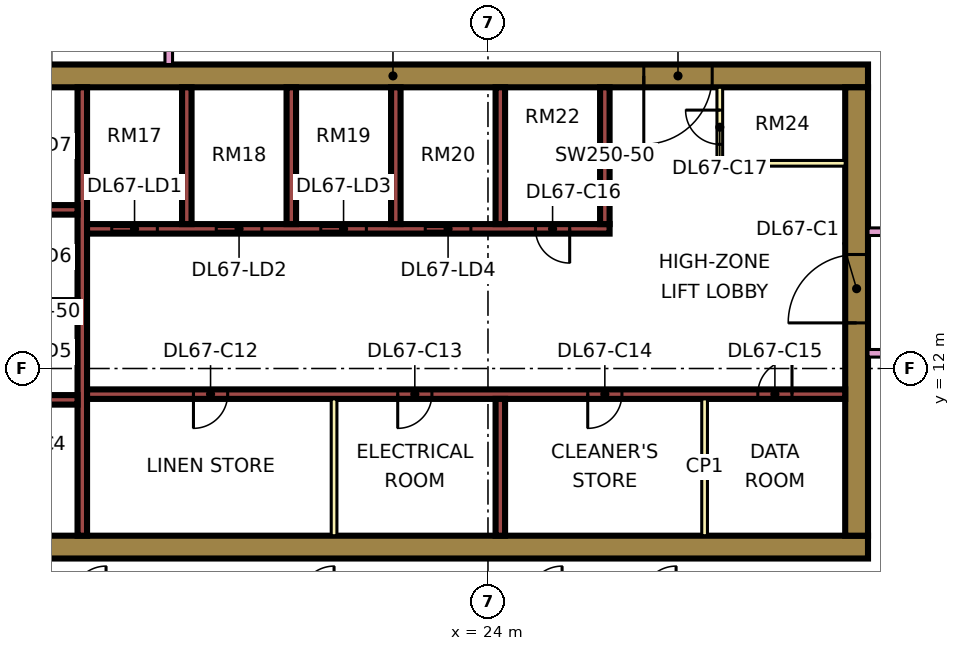
"""IFC4 building model, lengths in metres.
Left out: names, types, materials, properties, quantities, classifications, styles, units other than length and angle.
Written with IfcOpenShell. Run it as: python <this file> out.ifc"""

import sys

from ifc_helpers import new_model, si_unit, direction, frame, frame_2d, origin, place, context, subcontext, project, spatial, rectangle, extrude, element, fill, save


model = new_model("IFC4")
c1 = context("Model", 3, precision=1e-05, world=origin(), true_north=direction((0.0, 1.0)))
c2 = subcontext(c1, "Body", "Model", "MODEL_VIEW")
j1 = project(units=[si_unit("LENGTHUNIT", "METRE"), si_unit("PLANEANGLEUNIT", "RADIAN")], contexts=[c1])
p1 = place(None, origin())
s1 = spatial("IfcSite", under=j1, at=p1, CompositionType="ELEMENT")
p2 = place(p1, origin())
s2 = spatial("IfcBuilding", under=s1, at=p2, CompositionType="ELEMENT")
p3 = place(p2, frame((0.0, 0.0, 288.4)))
s3 = spatial("IfcBuildingStorey", under=s2, at=p3, CompositionType="ELEMENT", Elevation=288.4)
p4 = place(p3, frame((9.0, 7.3, 0.0), z_axis=(0.0, 0.0, 1.0), x_axis=(1.0, 0.0, 0.0)))
e1 = element("IfcWall", 1, at=p4, inside=s3, PredefinedType="SHEAR", context=c2, shape_type="SweptSolid", body=[
    extrude(rectangle(XDim=25.0, YDim=0.6, at=frame_2d((12.5, 0.0))), origin(), (0.0, 0.0, 1.0), 3.75),
])
p5 = place(p3, frame((9.0, 19.7, 0.0), z_axis=(0.0, 0.0, 1.0), x_axis=(1.0, 0.0, 0.0)))
e2 = element("IfcWall", 2, at=p5, inside=s3, PredefinedType="SHEAR", context=c2, shape_type="SweptSolid", body=[
    extrude(rectangle(XDim=25.0, YDim=0.6, at=frame_2d((12.5, 0.0))), origin(), (0.0, 0.0, 1.0), 3.75),
])
p6 = place(p5, frame((19.1, 0.0, 0.0)))
e3 = element("IfcOpeningElement", 3, at=p6, cuts=e2, PredefinedType="OPENING", context=c2, shape_type="SweptSolid", body=[
    extrude(rectangle(XDim=1.8, YDim=2.4, at=frame_2d((0.9, 1.2))), frame((0.0, 0.31, 0.0), z_axis=(0.0, -1.0, 0.0), x_axis=(1.0, 0.0, 0.0)), (0.0, 0.0, 1.0), 0.62),
])
p7 = place(p3, frame((33.7, 7.6, 0.0), z_axis=(0.0, 0.0, 1.0), x_axis=(0.0, 1.0, 0.0)))
e4 = element("IfcWall", 4, at=p7, inside=s3, PredefinedType="SHEAR", context=c2, shape_type="SweptSolid", body=[
    extrude(rectangle(XDim=11.8, YDim=0.6, at=frame_2d((5.9, 0.0))), origin(), (0.0, 0.0, 1.0), 3.75),
])
p8 = place(p7, frame((5.6, 0.0, 0.0)))
e5 = element("IfcOpeningElement", 5, at=p8, cuts=e4, PredefinedType="OPENING", context=c2, shape_type="SweptSolid", body=[
    extrude(rectangle(XDim=1.8, YDim=2.4, at=frame_2d((0.9, 1.2))), frame((0.0, 0.31, 0.0), z_axis=(0.0, -1.0, 0.0), x_axis=(1.0, 0.0, 0.0)), (0.0, 0.0, 1.0), 0.62),
])
p9 = place(p3, frame((13.325, 7.6, 0.0), z_axis=(0.0, 0.0, 1.0), x_axis=(0.0, 1.0, 0.0)))
e6 = element("IfcWall", 6, at=p9, inside=s3, PredefinedType="SHEAR", context=c2, shape_type="SweptSolid", body=[
    extrude(rectangle(XDim=11.8, YDim=0.25, at=frame_2d((5.9, 0.0))), origin(), (0.0, 0.0, 1.0), 3.75),
])
p10 = place(p3, frame((13.45, 11.325, 0.0), z_axis=(0.0, 0.0, 1.0), x_axis=(1.0, 0.0, 0.0)))
e7 = element("IfcWall", 7, at=p10, inside=s3, PredefinedType="SHEAR", context=c2, shape_type="SweptSolid", body=[
    extrude(rectangle(XDim=19.95, YDim=0.25, at=frame_2d((9.975, 0.0))), origin(), (0.0, 0.0, 1.0), 3.75),
])
p11 = place(p10, frame((2.8, 0.0, 0.0)))
e8 = element("IfcOpeningElement", 8, at=p11, cuts=e7, PredefinedType="OPENING", context=c2, shape_type="SweptSolid", body=[
    extrude(rectangle(XDim=0.9, YDim=2.1, at=frame_2d((0.45, 1.05))), frame((0.0, 0.135, 0.0), z_axis=(0.0, -1.0, 0.0), x_axis=(1.0, 0.0, 0.0)), (0.0, 0.0, 1.0), 0.27),
])
p12 = place(p10, frame((8.175, 0.0, 0.0)))
e9 = element("IfcOpeningElement", 9, at=p12, cuts=e7, PredefinedType="OPENING", context=c2, shape_type="SweptSolid", body=[
    extrude(rectangle(XDim=0.9, YDim=2.1, at=frame_2d((0.45, 1.05))), frame((0.0, 0.135, 0.0), z_axis=(0.0, -1.0, 0.0), x_axis=(1.0, 0.0, 0.0)), (0.0, 0.0, 1.0), 0.27),
])
p13 = place(p10, frame((13.175, 0.0, 0.0)))
e10 = element("IfcOpeningElement", 10, at=p13, cuts=e7, PredefinedType="OPENING", context=c2, shape_type="SweptSolid", body=[
    extrude(rectangle(XDim=0.9, YDim=2.1, at=frame_2d((0.45, 1.05))), frame((0.0, 0.135, 0.0), z_axis=(0.0, -1.0, 0.0), x_axis=(1.0, 0.0, 0.0)), (0.0, 0.0, 1.0), 0.27),
])
p14 = place(p10, frame((17.65, 0.0, 0.0)))
e11 = element("IfcOpeningElement", 11, at=p14, cuts=e7, PredefinedType="OPENING", context=c2, shape_type="SweptSolid", body=[
    extrude(rectangle(XDim=0.9, YDim=2.1, at=frame_2d((0.45, 1.05))), frame((0.0, 0.135, 0.0), z_axis=(0.0, -1.0, 0.0), x_axis=(1.0, 0.0, 0.0)), (0.0, 0.0, 1.0), 0.27),
])
p15 = place(p3, frame((13.45, 15.675, 0.0), z_axis=(0.0, 0.0, 1.0), x_axis=(1.0, 0.0, 0.0)))
e12 = element("IfcWall", 12, at=p15, inside=s3, PredefinedType="SHEAR", context=c2, shape_type="SweptSolid", body=[
    extrude(rectangle(XDim=13.75, YDim=0.25, at=frame_2d((6.875, 0.0))), origin(), (0.0, 0.0, 1.0), 3.75),
])
p16 = place(p15, frame((0.65, 0.0, 0.0)))
e13 = element("IfcOpeningElement", 13, at=p16, cuts=e12, PredefinedType="OPENING", context=c2, shape_type="SweptSolid", body=[
    extrude(rectangle(XDim=1.2, YDim=2.2, at=frame_2d((0.6, 1.1))), frame((0.0, 0.135, 0.0), z_axis=(0.0, -1.0, 0.0), x_axis=(1.0, 0.0, 0.0)), (0.0, 0.0, 1.0), 0.27),
])
p17 = place(p15, frame((3.4, 0.0, 0.0)))
e14 = element("IfcOpeningElement", 14, at=p17, cuts=e12, PredefinedType="OPENING", context=c2, shape_type="SweptSolid", body=[
    extrude(rectangle(XDim=1.2, YDim=2.2, at=frame_2d((0.6, 1.1))), frame((0.0, 0.135, 0.0), z_axis=(0.0, -1.0, 0.0), x_axis=(1.0, 0.0, 0.0)), (0.0, 0.0, 1.0), 0.27),
])
p18 = place(p15, frame((6.15, 0.0, 0.0)))
e15 = element("IfcOpeningElement", 15, at=p18, cuts=e12, PredefinedType="OPENING", context=c2, shape_type="SweptSolid", body=[
    extrude(rectangle(XDim=1.2, YDim=2.2, at=frame_2d((0.6, 1.1))), frame((0.0, 0.135, 0.0), z_axis=(0.0, -1.0, 0.0), x_axis=(1.0, 0.0, 0.0)), (0.0, 0.0, 1.0), 0.27),
])
p19 = place(p15, frame((8.9, 0.0, 0.0)))
e16 = element("IfcOpeningElement", 16, at=p19, cuts=e12, PredefinedType="OPENING", context=c2, shape_type="SweptSolid", body=[
    extrude(rectangle(XDim=1.2, YDim=2.2, at=frame_2d((0.6, 1.1))), frame((0.0, 0.135, 0.0), z_axis=(0.0, -1.0, 0.0), x_axis=(1.0, 0.0, 0.0)), (0.0, 0.0, 1.0), 0.27),
])
p20 = place(p15, frame((11.8, 0.0, 0.0)))
e17 = element("IfcOpeningElement", 17, at=p20, cuts=e12, PredefinedType="OPENING", context=c2, shape_type="SweptSolid", body=[
    extrude(rectangle(XDim=0.9, YDim=2.1, at=frame_2d((0.45, 1.05))), frame((0.0, 0.135, 0.0), z_axis=(0.0, -1.0, 0.0), x_axis=(1.0, 0.0, 0.0)), (0.0, 0.0, 1.0), 0.27),
])
for number, where, z_axis, x_axis in (
    (18, (10.2, 11.175, 0.0), (0.0, 0.0, 1.0), (1.0, 0.0, 0.0)),
    (19, (10.2, 13.675, 0.0), (0.0, 0.0, 1.0), (1.0, 0.0, 0.0)),
    (20, (10.2, 16.175, 0.0), (0.0, 0.0, 1.0), (1.0, 0.0, 0.0)),
):
    element("IfcWall", number, at=place(p3, frame(where, z_axis=z_axis, x_axis=x_axis)), inside=s3, PredefinedType="SHEAR", context=c2, shape_type="SweptSolid", body=[
        extrude(rectangle(XDim=3.0, YDim=0.25, at=frame_2d((1.5, 0.0))), origin(), (0.0, 0.0, 1.0), 3.75),
    ])
for number, where, z_axis, x_axis in (
    (21, (24.325, 7.6, 0.0), (0.0, 0.0, 1.0), (0.0, 1.0, 0.0)),
    (22, (16.075, 15.8, 0.0), (0.0, 0.0, 1.0), (0.0, 1.0, 0.0)),
    (23, (18.825, 15.8, 0.0), (0.0, 0.0, 1.0), (0.0, 1.0, 0.0)),
    (24, (21.575, 15.8, 0.0), (0.0, 0.0, 1.0), (0.0, 1.0, 0.0)),
    (25, (24.325, 15.8, 0.0), (0.0, 0.0, 1.0), (0.0, 1.0, 0.0)),
    (26, (27.075, 15.8, 0.0), (0.0, 0.0, 1.0), (0.0, 1.0, 0.0)),
):
    element("IfcWall", number, at=place(p3, frame(where, z_axis=z_axis, x_axis=x_axis)), inside=s3, PredefinedType="SHEAR", context=c2, shape_type="SweptSolid", body=[
        extrude(rectangle(XDim=3.6, YDim=0.25, at=frame_2d((1.8, 0.0))), origin(), (0.0, 0.0, 1.0), 3.75),
    ])
p21 = place(p3, frame((-1.447, 12.553, 0.0), z_axis=(0.0, 0.0, 1.0), x_axis=(0.707106781187, -0.707106781187, 0.0)))
e27 = element("IfcWall", 27, at=p21, inside=s3, PredefinedType="SOLIDWALL", context=c2, shape_type="SweptSolid", body=[
    extrude(rectangle(XDim=19.799, YDim=0.15, at=frame_2d((9.899, 0.0))), origin(), (0.0, 0.0, 1.0), 3.35),
])
p22 = place(p21, frame((2.212, 0.0, 0.45)))
e28 = element("IfcOpeningElement", 28, at=p22, cuts=e27, PredefinedType="OPENING", context=c2, shape_type="SweptSolid", body=[
    extrude(rectangle(XDim=3.0, YDim=2.4, at=frame_2d((1.5, 1.2))), frame((0.0, 0.085, 0.0), z_axis=(0.0, -1.0, 0.0), x_axis=(1.0, 0.0, 0.0)), (0.0, 0.0, 1.0), 0.17),
])
p23 = place(p21, frame((10.216, 0.0, 0.45)))
e29 = element("IfcOpeningElement", 29, at=p23, cuts=e27, PredefinedType="OPENING", context=c2, shape_type="SweptSolid", body=[
    extrude(rectangle(XDim=3.0, YDim=2.4, at=frame_2d((1.5, 1.2))), frame((0.0, 0.085, 0.0), z_axis=(0.0, -1.0, 0.0), x_axis=(1.0, 0.0, 0.0)), (0.0, 0.0, 1.0), 0.17),
])
for number, where, z_axis, x_axis in (
    (30, (19.95, 7.6, 0.0), (0.0, 0.0, 1.0), (0.0, 1.0, 0.0)),
    (31, (29.7, 7.6, 0.0), (0.0, 0.0, 1.0), (0.0, 1.0, 0.0)),
):
    element("IfcWall", number, at=place(p3, frame(where, z_axis=z_axis, x_axis=x_axis)), inside=s3, PredefinedType="PARTITIONING", context=c2, shape_type="SweptSolid", body=[
        extrude(rectangle(XDim=3.6, YDim=0.15, at=frame_2d((1.8, 0.0))), origin(), (0.0, 0.0, 1.0), 3.35),
    ])
p24 = place(p3, frame((30.1, 17.4, 0.0), z_axis=(0.0, 0.0, 1.0), x_axis=(0.0, 1.0, 0.0)))
e32 = element("IfcWall", 32, at=p24, inside=s3, PredefinedType="PARTITIONING", context=c2, shape_type="SweptSolid", body=[
    extrude(rectangle(XDim=2.0, YDim=0.15, at=frame_2d((1.0, 0.0))), origin(), (0.0, 0.0, 1.0), 3.35),
])
p25 = place(p24, frame((0.5, 0.0, 0.0)))
e33 = element("IfcOpeningElement", 33, at=p25, cuts=e32, PredefinedType="OPENING", context=c2, shape_type="SweptSolid", body=[
    extrude(rectangle(XDim=0.9, YDim=2.1, at=frame_2d((0.45, 1.05))), frame((0.0, 0.085, 0.0), z_axis=(0.0, -1.0, 0.0), x_axis=(1.0, 0.0, 0.0)), (0.0, 0.0, 1.0), 0.17),
])
p26 = place(p3, frame((30.1, 17.4, 0.0), z_axis=(0.0, 0.0, 1.0), x_axis=(1.0, 0.0, 0.0)))
e34 = element("IfcWall", 34, at=p26, inside=s3, PredefinedType="PARTITIONING", context=c2, shape_type="SweptSolid", body=[
    extrude(rectangle(XDim=3.3, YDim=0.15, at=frame_2d((1.65, 0.0))), origin(), (0.0, 0.0, 1.0), 3.35),
])
p27 = place(p3, frame((15.6, 20.0, 0.0), z_axis=(0.0, 0.0, 1.0), x_axis=(0.0, 1.0, 0.0)))
e35 = element("IfcWall", 35, at=p27, inside=s3, PredefinedType="PARTITIONING", context=c2, shape_type="SweptSolid", body=[
    extrude(rectangle(XDim=27.775, YDim=0.2, at=frame_2d((13.887, 0.0))), origin(), (0.0, 0.0, 1.0), 3.35),
])
p28 = place(p27, frame((7.15, 0.0, 0.0)))
e36 = element("IfcOpeningElement", 36, at=p28, cuts=e35, PredefinedType="OPENING", context=c2, shape_type="SweptSolid", body=[
    extrude(rectangle(XDim=1.6, YDim=2.1, at=frame_2d((0.8, 1.05))), frame((0.0, 0.11, 0.0), z_axis=(0.0, -1.0, 0.0), x_axis=(1.0, 0.0, 0.0)), (0.0, 0.0, 1.0), 0.22),
])
p29 = place(p27, frame((13.5, 0.0, 0.0)))
e37 = element("IfcOpeningElement", 37, at=p29, cuts=e35, PredefinedType="OPENING", context=c2, shape_type="SweptSolid", body=[
    extrude(rectangle(XDim=1.0, YDim=2.1, at=frame_2d((0.5, 1.05))), frame((0.0, 0.11, 0.0), z_axis=(0.0, -1.0, 0.0), x_axis=(1.0, 0.0, 0.0)), (0.0, 0.0, 1.0), 0.22),
])
p30 = place(p27, frame((22.75, 0.0, 0.0)))
e38 = element("IfcOpeningElement", 38, at=p30, cuts=e35, PredefinedType="OPENING", context=c2, shape_type="SweptSolid", body=[
    extrude(rectangle(XDim=1.0, YDim=2.1, at=frame_2d((0.5, 1.05))), frame((0.0, 0.11, 0.0), z_axis=(0.0, -1.0, 0.0), x_axis=(1.0, 0.0, 0.0)), (0.0, 0.0, 1.0), 0.22),
])
p31 = place(p27, frame((1.15, 0.0, 0.0)))
e39 = element("IfcOpeningElement", 39, at=p31, cuts=e35, PredefinedType="OPENING", context=c2, shape_type="SweptSolid", body=[
    extrude(rectangle(XDim=1.8, YDim=2.1, at=frame_2d((0.9, 1.05))), frame((0.0, 0.11, 0.0), z_axis=(0.0, -1.0, 0.0), x_axis=(1.0, 0.0, 0.0)), (0.0, 0.0, 1.0), 0.22),
])
p32 = place(p27, frame((25.9, 0.0, 0.0)))
e40 = element("IfcOpeningElement", 40, at=p32, cuts=e35, PredefinedType="OPENING", context=c2, shape_type="SweptSolid", body=[
    extrude(rectangle(XDim=1.0, YDim=2.1, at=frame_2d((0.5, 1.05))), frame((0.0, 0.11, 0.0), z_axis=(0.0, -1.0, 0.0), x_axis=(1.0, 0.0, 0.0)), (0.0, 0.0, 1.0), 0.22),
])
p33 = place(p3, frame((34.0, 12.4, 0.0), z_axis=(0.0, 0.0, 1.0), x_axis=(1.0, 0.0, 0.0)))
e41 = element("IfcWall", 41, at=p33, inside=s3, PredefinedType="PARTITIONING", context=c2, shape_type="SweptSolid", body=[
    extrude(rectangle(XDim=2.401, YDim=0.2, at=frame_2d((1.2, 0.0))), origin(), (0.0, 0.0, 1.0), 3.35),
])
p34 = place(p3, frame((34.0, 15.6, 0.0), z_axis=(0.0, 0.0, 1.0), x_axis=(1.0, 0.0, 0.0)))
e42 = element("IfcWall", 42, at=p34, inside=s3, PredefinedType="PARTITIONING", context=c2, shape_type="SweptSolid", body=[
    extrude(rectangle(XDim=10.35, YDim=0.2, at=frame_2d((5.175, 0.0))), origin(), (0.0, 0.0, 1.0), 3.35),
])
p35 = place(p34, frame((5.6, 0.0, 0.0)))
e43 = element("IfcOpeningElement", 43, at=p35, cuts=e42, PredefinedType="OPENING", context=c2, shape_type="SweptSolid", body=[
    extrude(rectangle(XDim=1.0, YDim=2.1, at=frame_2d((0.5, 1.05))), frame((0.0, 0.11, 0.0), z_axis=(0.0, -1.0, 0.0), x_axis=(1.0, 0.0, 0.0)), (0.0, 0.0, 1.0), 0.22),
])
p36 = place(p34, frame((0.45, 0.0, 0.0)))
e44 = element("IfcOpeningElement", 44, at=p36, cuts=e42, PredefinedType="OPENING", context=c2, shape_type="SweptSolid", body=[
    extrude(rectangle(XDim=1.2, YDim=2.1, at=frame_2d((0.6, 1.05))), frame((0.0, 0.11, 0.0), z_axis=(0.0, -1.0, 0.0), x_axis=(1.0, 0.0, 0.0)), (0.0, 0.0, 1.0), 0.22),
])
p37 = place(p16, origin())
e45 = element("IfcDoor", 45, at=p37, inside=s3, OperationType="DOUBLE_DOOR_SLIDING", PredefinedType="DOOR", context=c2, shape_type="SweptSolid", body=[
    extrude(rectangle(XDim=1.2, YDim=2.2, at=frame_2d((0.6, 1.1))), frame((0.0, 0.025, 0.0), z_axis=(0.0, -1.0, 0.0), x_axis=(1.0, 0.0, 0.0)), (0.0, 0.0, 1.0), 0.05),
])
fill(e13, e45)
p38 = place(p17, origin())
e46 = element("IfcDoor", 46, at=p38, inside=s3, OperationType="DOUBLE_DOOR_SLIDING", PredefinedType="DOOR", context=c2, shape_type="SweptSolid", body=[
    extrude(rectangle(XDim=1.2, YDim=2.2, at=frame_2d((0.6, 1.1))), frame((0.0, 0.025, 0.0), z_axis=(0.0, -1.0, 0.0), x_axis=(1.0, 0.0, 0.0)), (0.0, 0.0, 1.0), 0.05),
])
fill(e14, e46)
p39 = place(p18, origin())
e47 = element("IfcDoor", 47, at=p39, inside=s3, OperationType="DOUBLE_DOOR_SLIDING", PredefinedType="DOOR", context=c2, shape_type="SweptSolid", body=[
    extrude(rectangle(XDim=1.2, YDim=2.2, at=frame_2d((0.6, 1.1))), frame((0.0, 0.025, 0.0), z_axis=(0.0, -1.0, 0.0), x_axis=(1.0, 0.0, 0.0)), (0.0, 0.0, 1.0), 0.05),
])
fill(e15, e47)
p40 = place(p19, origin())
e48 = element("IfcDoor", 48, at=p40, inside=s3, OperationType="DOUBLE_DOOR_SLIDING", PredefinedType="DOOR", context=c2, shape_type="SweptSolid", body=[
    extrude(rectangle(XDim=1.2, YDim=2.2, at=frame_2d((0.6, 1.1))), frame((0.0, 0.025, 0.0), z_axis=(0.0, -1.0, 0.0), x_axis=(1.0, 0.0, 0.0)), (0.0, 0.0, 1.0), 0.05),
])
fill(e16, e48)
p41 = place(p8, origin())
e49 = element("IfcDoor", 49, at=p41, inside=s3, OperationType="DOUBLE_DOOR_SINGLE_SWING", PredefinedType="DOOR", context=c2, shape_type="SweptSolid", body=[
    extrude(rectangle(XDim=1.8, YDim=2.4, at=frame_2d((0.9, 1.2))), frame((0.0, 0.025, 0.0), z_axis=(0.0, -1.0, 0.0), x_axis=(1.0, 0.0, 0.0)), (0.0, 0.0, 1.0), 0.05),
])
fill(e5, e49)
p42 = place(p6, frame((1.8, 0.0, 0.0), z_axis=(0.0, 0.0, 1.0), x_axis=(-1.0, 0.0, 0.0)))
e50 = element("IfcDoor", 50, at=p42, inside=s3, OperationType="DOUBLE_DOOR_SINGLE_SWING", PredefinedType="DOOR", context=c2, shape_type="SweptSolid", body=[
    extrude(rectangle(XDim=1.8, YDim=2.4, at=frame_2d((0.9, 1.2))), frame((0.0, 0.025, 0.0), z_axis=(0.0, -1.0, 0.0), x_axis=(1.0, 0.0, 0.0)), (0.0, 0.0, 1.0), 0.05),
])
fill(e3, e50)
p43 = place(p11, frame((0.9, 0.0, 0.0), z_axis=(0.0, 0.0, 1.0), x_axis=(-1.0, 0.0, 0.0)))
e51 = element("IfcDoor", 51, at=p43, inside=s3, OperationType="SINGLE_SWING_LEFT", PredefinedType="DOOR", context=c2, shape_type="SweptSolid", body=[
    extrude(rectangle(XDim=0.9, YDim=2.1, at=frame_2d((0.45, 1.05))), frame((0.0, 0.025, 0.0), z_axis=(0.0, -1.0, 0.0), x_axis=(1.0, 0.0, 0.0)), (0.0, 0.0, 1.0), 0.05),
])
fill(e8, e51)
p44 = place(p12, frame((0.9, 0.0, 0.0), z_axis=(0.0, 0.0, 1.0), x_axis=(-1.0, 0.0, 0.0)))
e52 = element("IfcDoor", 52, at=p44, inside=s3, OperationType="SINGLE_SWING_LEFT", PredefinedType="DOOR", context=c2, shape_type="SweptSolid", body=[
    extrude(rectangle(XDim=0.9, YDim=2.1, at=frame_2d((0.45, 1.05))), frame((0.0, 0.025, 0.0), z_axis=(0.0, -1.0, 0.0), x_axis=(1.0, 0.0, 0.0)), (0.0, 0.0, 1.0), 0.05),
])
fill(e9, e52)
p45 = place(p13, frame((0.9, 0.0, 0.0), z_axis=(0.0, 0.0, 1.0), x_axis=(-1.0, 0.0, 0.0)))
e53 = element("IfcDoor", 53, at=p45, inside=s3, OperationType="SINGLE_SWING_LEFT", PredefinedType="DOOR", context=c2, shape_type="SweptSolid", body=[
    extrude(rectangle(XDim=0.9, YDim=2.1, at=frame_2d((0.45, 1.05))), frame((0.0, 0.025, 0.0), z_axis=(0.0, -1.0, 0.0), x_axis=(1.0, 0.0, 0.0)), (0.0, 0.0, 1.0), 0.05),
])
fill(e10, e53)
p46 = place(p14, frame((0.9, 0.0, 0.0), z_axis=(0.0, 0.0, 1.0), x_axis=(-1.0, 0.0, 0.0)))
e54 = element("IfcDoor", 54, at=p46, inside=s3, OperationType="SINGLE_SWING_RIGHT", PredefinedType="DOOR", context=c2, shape_type="SweptSolid", body=[
    extrude(rectangle(XDim=0.9, YDim=2.1, at=frame_2d((0.45, 1.05))), frame((0.0, 0.025, 0.0), z_axis=(0.0, -1.0, 0.0), x_axis=(1.0, 0.0, 0.0)), (0.0, 0.0, 1.0), 0.05),
])
fill(e11, e54)
p47 = place(p20, origin())
e55 = element("IfcDoor", 55, at=p47, inside=s3, OperationType="SINGLE_SWING_RIGHT", PredefinedType="DOOR", context=c2, shape_type="SweptSolid", body=[
    extrude(rectangle(XDim=0.9, YDim=2.1, at=frame_2d((0.45, 1.05))), frame((0.0, 0.025, 0.0), z_axis=(0.0, -1.0, 0.0), x_axis=(1.0, 0.0, 0.0)), (0.0, 0.0, 1.0), 0.05),
])
fill(e17, e55)
p48 = place(p25, frame((0.9, 0.0, 0.0), z_axis=(0.0, 0.0, 1.0), x_axis=(-1.0, 0.0, 0.0)))
e56 = element("IfcDoor", 56, at=p48, inside=s3, OperationType="SINGLE_SWING_RIGHT", PredefinedType="DOOR", context=c2, shape_type="SweptSolid", body=[
    extrude(rectangle(XDim=0.9, YDim=2.1, at=frame_2d((0.45, 1.05))), frame((0.0, 0.025, 0.0), z_axis=(0.0, -1.0, 0.0), x_axis=(1.0, 0.0, 0.0)), (0.0, 0.0, 1.0), 0.05),
])
fill(e33, e56)
save(model, sys.argv[1])
